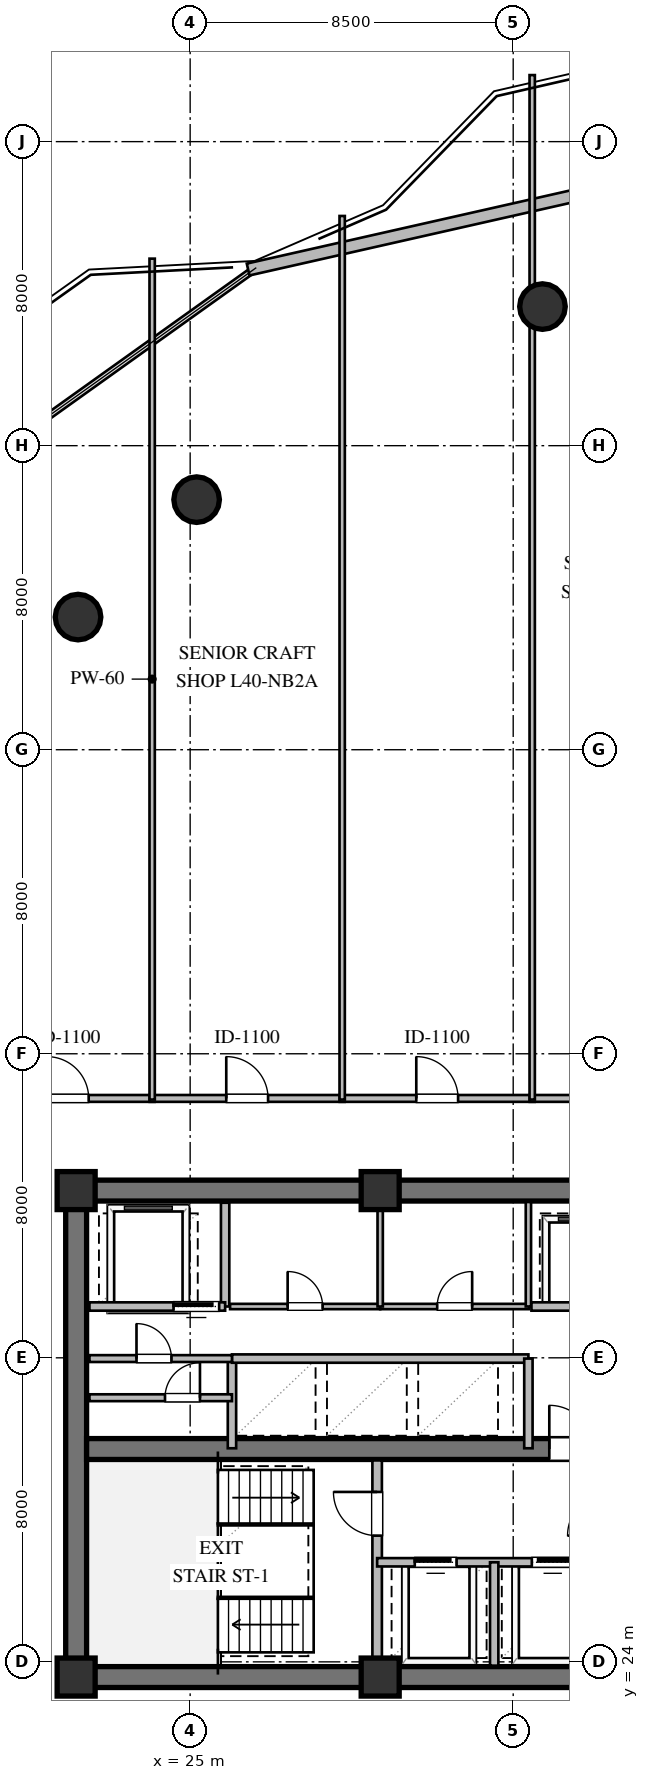
"""IFC4 building model, lengths in metres.
Left out: names, types, materials, properties, quantities, classifications, styles, units other than length and angle.
Written with IfcOpenShell. Run it as: python <this file> out.ifc"""

import sys

from ifc_helpers import new_model, si_unit, direction, frame, frame_2d, origin, origin_2d, place, context, subcontext, project, spatial, rectangle, circle, extrude, element, fill, save


model = new_model("IFC4")
c1 = context("Model", 3, precision=1e-05, world=origin(), true_north=direction((0.0, 1.0)))
c2 = subcontext(c1, "Body", "Model", "MODEL_VIEW")
j1 = project(units=[si_unit("LENGTHUNIT", "METRE"), si_unit("PLANEANGLEUNIT", "RADIAN")], contexts=[c1])
p1 = place(None, origin())
s1 = spatial("IfcSite", under=j1, at=p1, CompositionType="ELEMENT")
p2 = place(p1, origin())
s2 = spatial("IfcBuilding", under=s1, at=p2, CompositionType="ELEMENT")
p3 = place(p2, frame((0.0, 0.0, 153.0)))
s3 = spatial("IfcBuildingStorey", under=s2, at=p3, CompositionType="ELEMENT", Elevation=153.0)
for number, where, z_axis, x_axis in (
    (1, (21.725, 23.6, 0.0), (0.0, 0.0, 1.0), (1.0, 0.0, 0.0)),
    (2, (21.725, 36.4, 0.0), (0.0, 0.0, 1.0), (1.0, 0.0, 0.0)),
):
    element("IfcWall", number, at=place(p3, frame(where, z_axis=z_axis, x_axis=x_axis)), inside=s3, PredefinedType="SHEAR", context=c2, shape_type="SweptSolid", body=[
        extrude(rectangle(XDim=22.55, YDim=0.55, at=frame_2d((11.275, 0.0))), origin(), (0.0, 0.0, 1.0), 3.36),
    ])
p4 = place(p3, frame((22.0, 23.875, 0.0), z_axis=(0.0, 0.0, 1.0), x_axis=(0.0, 1.0, 0.0)))
e3 = element("IfcWall", 3, at=p4, inside=s3, PredefinedType="SHEAR", context=c2, shape_type="SweptSolid", body=[
    extrude(rectangle(XDim=12.25, YDim=0.55, at=frame_2d((6.125, 0.0))), origin(), (0.0, 0.0, 1.0), 3.36),
])
p5 = place(p3, frame((22.275, 29.6, 0.0), z_axis=(0.0, 0.0, 1.0), x_axis=(1.0, 0.0, 0.0)))
e4 = element("IfcWall", 4, at=p5, inside=s3, PredefinedType="SHEAR", context=c2, shape_type="SweptSolid", body=[
    extrude(rectangle(XDim=21.45, YDim=0.55, at=frame_2d((10.725, 0.0))), origin(), (0.0, 0.0, 1.0), 3.36),
])
p6 = place(p5, frame((12.175, 0.0, 0.0)))
e5 = element("IfcOpeningElement", 5, at=p6, cuts=e4, PredefinedType="OPENING", context=c2, shape_type="SweptSolid", body=[
    extrude(rectangle(XDim=1.15, YDim=2.1, at=frame_2d((0.575, 1.05))), frame((0.0, 0.285, 0.0), z_axis=(0.0, -1.0, 0.0), x_axis=(1.0, 0.0, 0.0)), (0.0, 0.0, 1.0), 0.57),
])
for number, where, z_axis, x_axis in (
    (6, (22.0, 23.6, 0.0), (0.0, 0.0, 1.0), (1.0, 0.0, 0.0)),
    (7, (30.0, 23.6, 0.0), (0.0, 0.0, 1.0), (1.0, 0.0, 0.0)),
    (8, (30.0, 36.4, 0.0), (0.0, 0.0, 1.0), (1.0, 0.0, 0.0)),
    (9, (22.0, 36.4, 0.0), (0.0, 0.0, 1.0), (1.0, 0.0, 0.0)),
):
    element("IfcColumn", number, at=place(p3, frame(where, z_axis=z_axis, x_axis=x_axis)), inside=s3, PredefinedType="COLUMN", context=c2, shape_type="SweptSolid", body=[
        extrude(rectangle(XDim=1.0, YDim=1.0, at=origin_2d()), origin(), (0.0, 0.0, 1.0), 3.6),
    ])
for number, where, z_axis, x_axis in (
    (10, (34.27, 59.66, 0.0), (0.0, 0.0, 1.0), (1.0, 0.0, 0.0)),
    (11, (25.17, 54.58, 0.0), (0.0, 0.0, 1.0), (1.0, 0.0, 0.0)),
    (12, (22.05, 51.49, 0.0), (0.0, 0.0, 1.0), (1.0, 0.0, 0.0)),
):
    element("IfcColumn", number, at=place(p3, frame(where, z_axis=z_axis, x_axis=x_axis)), inside=s3, PredefinedType="COLUMN", context=c2, shape_type="SweptSolid", body=[
        extrude(circle(Radius=0.6, at=origin_2d()), origin(), (0.0, 0.0, 1.0), 3.6),
    ])
p7 = place(p3, frame((26.525, 60.635, 0.0), z_axis=(0.0, 0.0, 1.0), x_axis=(0.975368700272, 0.220580820855, 0.0)))
e13 = element("IfcWall", 13, at=p7, inside=s3, PredefinedType="STANDARD", context=c2, shape_type="SweptSolid", body=[
    extrude(rectangle(XDim=19.204, YDim=0.32, at=frame_2d((9.602, 0.0))), origin(), (0.0, 0.0, 1.0), 3.36),
])
p8 = place(p7, frame((8.801, 0.0, 1.05)))
e14 = element("IfcOpeningElement", 14, at=p8, cuts=e13, PredefinedType="OPENING", context=c2, shape_type="SweptSolid", body=[
    extrude(rectangle(XDim=1.6, YDim=1.5, at=frame_2d((0.8, 0.75))), frame((0.0, 0.17, 0.0), z_axis=(0.0, -1.0, 0.0), x_axis=(1.0, 0.0, 0.0)), (0.0, 0.0, 1.0), 0.34),
])
p9 = place(p3, frame((29.92, 23.9, 0.0), z_axis=(0.0, 0.0, 1.0), x_axis=(0.0, 1.0, 0.0)))
e15 = element("IfcWall", 15, at=p9, inside=s3, PredefinedType="SOLIDWALL", context=c2, shape_type="SweptSolid", body=[
    extrude(rectangle(XDim=5.4, YDim=0.25, at=frame_2d((2.7, 0.0))), origin(), (0.0, 0.0, 1.0), 2.806),
])
p10 = place(p9, frame((3.421, 0.0, 0.0)))
e16 = element("IfcOpeningElement", 16, at=p10, cuts=e15, PredefinedType="OPENING", context=c2, shape_type="SweptSolid", body=[
    extrude(rectangle(XDim=1.15, YDim=2.1, at=frame_2d((0.575, 1.05))), frame((0.0, 0.135, 0.0), z_axis=(0.0, -1.0, 0.0), x_axis=(1.0, 0.0, 0.0)), (0.0, 0.0, 1.0), 0.27),
])
p11 = place(p3, frame((29.92, 26.62, 0.0), z_axis=(0.0, 0.0, 1.0), x_axis=(1.0, 0.0, 0.0)))
e17 = element("IfcWall", 17, at=p11, inside=s3, PredefinedType="SOLIDWALL", context=c2, shape_type="SweptSolid", body=[
    extrude(rectangle(XDim=6.16, YDim=0.22, at=frame_2d((3.08, 0.0))), origin(), (0.0, 0.0, 1.0), 3.36),
])
p12 = place(p11, frame((0.99, 0.0, 0.0)))
e18 = element("IfcOpeningElement", 18, at=p12, cuts=e17, PredefinedType="OPENING", context=c2, shape_type="SweptSolid", body=[
    extrude(rectangle(XDim=1.1, YDim=2.1, at=frame_2d((0.55, 1.05))), frame((0.0, 0.12, 0.0), z_axis=(0.0, -1.0, 0.0), x_axis=(1.0, 0.0, 0.0)), (0.0, 0.0, 1.0), 0.24),
])
p13 = place(p11, frame((4.07, 0.0, 0.0)))
e19 = element("IfcOpeningElement", 19, at=p13, cuts=e17, PredefinedType="OPENING", context=c2, shape_type="SweptSolid", body=[
    extrude(rectangle(XDim=1.1, YDim=2.1, at=frame_2d((0.55, 1.05))), frame((0.0, 0.12, 0.0), z_axis=(0.0, -1.0, 0.0), x_axis=(1.0, 0.0, 0.0)), (0.0, 0.0, 1.0), 0.24),
])
p14 = place(p3, frame((33.0, 23.9, 0.0), z_axis=(0.0, 0.0, 1.0), x_axis=(0.0, 1.0, 0.0)))
e20 = element("IfcWall", 20, at=p14, inside=s3, PredefinedType="SOLIDWALL", context=c2, shape_type="SweptSolid", body=[
    extrude(rectangle(XDim=2.72, YDim=0.22, at=frame_2d((1.36, 0.0))), origin(), (0.0, 0.0, 1.0), 3.36),
])
p15 = place(p3, frame((25.92, 33.35, 0.0), z_axis=(0.0, 0.0, 1.0), x_axis=(0.0, 1.0, 0.0)))
e21 = element("IfcWall", 21, at=p15, inside=s3, PredefinedType="SOLIDWALL", context=c2, shape_type="SweptSolid", body=[
    extrude(rectangle(XDim=2.73, YDim=0.22, at=frame_2d((1.365, 0.0))), origin(), (0.0, 0.0, 1.0), 3.36),
])
p16 = place(p3, frame((22.35, 33.35, 0.0), z_axis=(0.0, 0.0, 1.0), x_axis=(1.0, 0.0, 0.0)))
e22 = element("IfcWall", 22, at=p16, inside=s3, PredefinedType="SOLIDWALL", context=c2, shape_type="SweptSolid", body=[
    extrude(rectangle(XDim=3.57, YDim=0.22, at=frame_2d((1.785, 0.0))), origin(), (0.0, 0.0, 1.0), 3.36),
])
p17 = place(p16, frame((2.213, 0.0, 0.0)))
e23 = element("IfcOpeningElement", 23, at=p17, cuts=e22, PredefinedType="OPENING", context=c2, shape_type="SweptSolid", body=[
    extrude(rectangle(XDim=1.2, YDim=2.1, at=frame_2d((0.6, 1.05))), frame((0.0, 0.12, 0.0), z_axis=(0.0, -1.0, 0.0), x_axis=(1.0, 0.0, 0.0)), (0.0, 0.0, 1.0), 0.24),
])
p18 = place(p3, frame((26.1, 29.62, 0.0), z_axis=(0.0, 0.0, 1.0), x_axis=(0.0, 1.0, 0.0)))
e24 = element("IfcWall", 24, at=p18, inside=s3, PredefinedType="SOLIDWALL", context=c2, shape_type="SweptSolid", body=[
    extrude(rectangle(XDim=2.36, YDim=0.22, at=frame_2d((1.18, 0.0))), origin(), (0.0, 0.0, 1.0), 3.36),
])
p19 = place(p3, frame((26.1, 31.98, 0.0), z_axis=(0.0, 0.0, 1.0), x_axis=(1.0, 0.0, 0.0)))
e25 = element("IfcWall", 25, at=p19, inside=s3, PredefinedType="SOLIDWALL", context=c2, shape_type="SweptSolid", body=[
    extrude(rectangle(XDim=7.8, YDim=0.22, at=frame_2d((3.9, 0.0))), origin(), (0.0, 0.0, 1.0), 3.36),
])
p20 = place(p3, frame((33.9, 29.62, 0.0), z_axis=(0.0, 0.0, 1.0), x_axis=(0.0, 1.0, 0.0)))
e26 = element("IfcWall", 26, at=p20, inside=s3, PredefinedType="SOLIDWALL", context=c2, shape_type="SweptSolid", body=[
    extrude(rectangle(XDim=2.36, YDim=0.22, at=frame_2d((1.18, 0.0))), origin(), (0.0, 0.0, 1.0), 3.36),
])
p21 = place(p3, frame((26.05, 33.35, 0.0), z_axis=(0.0, 0.0, 1.0), x_axis=(1.0, 0.0, 0.0)))
e27 = element("IfcWall", 27, at=p21, inside=s3, PredefinedType="PARTITIONING", context=c2, shape_type="SweptSolid", body=[
    extrude(rectangle(XDim=3.95, YDim=0.14, at=frame_2d((1.975, 0.0))), origin(), (0.0, 0.0, 1.0), 3.36),
])
p22 = place(p21, frame((1.515, 0.0, 0.0)))
e28 = element("IfcOpeningElement", 28, at=p22, cuts=e27, PredefinedType="OPENING", context=c2, shape_type="SweptSolid", body=[
    extrude(rectangle(XDim=0.92, YDim=2.1, at=frame_2d((0.46, 1.05))), frame((0.0, 0.08, 0.0), z_axis=(0.0, -1.0, 0.0), x_axis=(1.0, 0.0, 0.0)), (0.0, 0.0, 1.0), 0.16),
])
p23 = place(p3, frame((30.0, 33.35, 0.0), z_axis=(0.0, 0.0, 1.0), x_axis=(1.0, 0.0, 0.0)))
e29 = element("IfcWall", 29, at=p23, inside=s3, PredefinedType="PARTITIONING", context=c2, shape_type="SweptSolid", body=[
    extrude(rectangle(XDim=3.92, YDim=0.14, at=frame_2d((1.96, 0.0))), origin(), (0.0, 0.0, 1.0), 3.36),
])
p24 = place(p23, frame((1.5, 0.0, 0.0)))
e30 = element("IfcOpeningElement", 30, at=p24, cuts=e29, PredefinedType="OPENING", context=c2, shape_type="SweptSolid", body=[
    extrude(rectangle(XDim=0.92, YDim=2.1, at=frame_2d((0.46, 1.05))), frame((0.0, 0.08, 0.0), z_axis=(0.0, -1.0, 0.0), x_axis=(1.0, 0.0, 0.0)), (0.0, 0.0, 1.0), 0.16),
])
for number, where, z_axis, x_axis in (
    (31, (30.0, 33.35, 0.0), (0.0, 0.0, 1.0), (0.0, 1.0, 0.0)),
    (32, (33.9, 33.35, 0.0), (0.0, 0.0, 1.0), (0.0, 1.0, 0.0)),
):
    element("IfcWall", number, at=place(p3, frame(where, z_axis=z_axis, x_axis=x_axis)), inside=s3, PredefinedType="PARTITIONING", context=c2, shape_type="SweptSolid", body=[
        extrude(rectangle(XDim=2.75, YDim=0.14, at=frame_2d((1.375, 0.0))), origin(), (0.0, 0.0, 1.0), 3.36),
    ])
p25 = place(p3, frame((33.98, 33.35, 0.0), z_axis=(0.0, 0.0, 1.0), x_axis=(1.0, 0.0, 0.0)))
e33 = element("IfcWall", 33, at=p25, inside=s3, PredefinedType="SOLIDWALL", context=c2, shape_type="SweptSolid", body=[
    extrude(rectangle(XDim=7.54, YDim=0.22, at=frame_2d((3.77, 0.0))), origin(), (0.0, 0.0, 1.0), 3.36),
])
p26 = place(p25, frame((1.335, 0.0, 0.0)))
e34 = element("IfcOpeningElement", 34, at=p26, cuts=e33, PredefinedType="OPENING", context=c2, shape_type="SweptSolid", body=[
    extrude(rectangle(XDim=1.1, YDim=2.1, at=frame_2d((0.55, 1.05))), frame((0.0, 0.12, 0.0), z_axis=(0.0, -1.0, 0.0), x_axis=(1.0, 0.0, 0.0)), (0.0, 0.0, 1.0), 0.24),
])
p27 = place(p25, frame((4.879, 0.0, 0.0)))
e35 = element("IfcOpeningElement", 35, at=p27, cuts=e33, PredefinedType="OPENING", context=c2, shape_type="SweptSolid", body=[
    extrude(rectangle(XDim=1.1, YDim=2.1, at=frame_2d((0.55, 1.05))), frame((0.0, 0.12, 0.0), z_axis=(0.0, -1.0, 0.0), x_axis=(1.0, 0.0, 0.0)), (0.0, 0.0, 1.0), 0.24),
])
p28 = place(p3, frame((22.35, 30.95, 0.0), z_axis=(0.0, 0.0, 1.0), x_axis=(1.0, 0.0, 0.0)))
e36 = element("IfcWall", 36, at=p28, inside=s3, PredefinedType="PARTITIONING", context=c2, shape_type="SweptSolid", body=[
    extrude(rectangle(XDim=3.75, YDim=0.18, at=frame_2d((1.875, 0.0))), origin(), (0.0, 0.0, 1.0), 3.36),
])
p29 = place(p28, frame((1.988, 0.0, 0.0)))
e37 = element("IfcOpeningElement", 37, at=p29, cuts=e36, PredefinedType="OPENING", context=c2, shape_type="SweptSolid", body=[
    extrude(rectangle(XDim=0.92, YDim=2.1, at=frame_2d((0.46, 1.05))), frame((0.0, 0.1, 0.0), z_axis=(0.0, -1.0, 0.0), x_axis=(1.0, 0.0, 0.0)), (0.0, 0.0, 1.0), 0.2),
])
p30 = place(p3, frame((22.35, 31.98, 0.0), z_axis=(0.0, 0.0, 1.0), x_axis=(1.0, 0.0, 0.0)))
e38 = element("IfcWall", 38, at=p30, inside=s3, PredefinedType="PARTITIONING", context=c2, shape_type="SweptSolid", body=[
    extrude(rectangle(XDim=3.75, YDim=0.18, at=frame_2d((1.875, 0.0))), origin(), (0.0, 0.0, 1.0), 3.36),
])
p31 = place(p30, frame((1.238, 0.0, 0.0)))
e39 = element("IfcOpeningElement", 39, at=p31, cuts=e38, PredefinedType="OPENING", context=c2, shape_type="SweptSolid", body=[
    extrude(rectangle(XDim=0.92, YDim=2.1, at=frame_2d((0.46, 1.05))), frame((0.0, 0.1, 0.0), z_axis=(0.0, -1.0, 0.0), x_axis=(1.0, 0.0, 0.0)), (0.0, 0.0, 1.0), 0.2),
])
p32 = place(p3, frame((19.495, 38.825, 0.0), z_axis=(0.0, 0.0, 1.0), x_axis=(1.0, 0.0, 0.0)))
e40 = element("IfcWall", 40, at=p32, inside=s3, PredefinedType="PARTITIONING", context=c2, shape_type="SweptSolid", body=[
    extrude(rectangle(XDim=4.57, YDim=0.18, at=frame_2d((2.285, 0.0))), origin(), (0.0, 0.0, 1.0), 3.36),
])
p33 = place(p32, frame((1.735, 0.0, 0.0)))
e41 = element("IfcOpeningElement", 41, at=p33, cuts=e40, PredefinedType="OPENING", context=c2, shape_type="SweptSolid", body=[
    extrude(rectangle(XDim=1.1, YDim=2.1, at=frame_2d((0.55, 1.05))), frame((0.0, 0.1, 0.0), z_axis=(0.0, -1.0, 0.0), x_axis=(1.0, 0.0, 0.0)), (0.0, 0.0, 1.0), 0.2),
])
p34 = place(p3, frame((23.935, 38.825, 0.0), z_axis=(0.0, 0.0, 1.0), x_axis=(1.0, 0.0, 0.0)))
e42 = element("IfcWall", 42, at=p34, inside=s3, PredefinedType="PARTITIONING", context=c2, shape_type="SweptSolid", body=[
    extrude(rectangle(XDim=5.13, YDim=0.18, at=frame_2d((2.565, 0.0))), origin(), (0.0, 0.0, 1.0), 3.36),
])
p35 = place(p34, frame((2.015, 0.0, 0.0)))
e43 = element("IfcOpeningElement", 43, at=p35, cuts=e42, PredefinedType="OPENING", context=c2, shape_type="SweptSolid", body=[
    extrude(rectangle(XDim=1.1, YDim=2.1, at=frame_2d((0.55, 1.05))), frame((0.0, 0.1, 0.0), z_axis=(0.0, -1.0, 0.0), x_axis=(1.0, 0.0, 0.0)), (0.0, 0.0, 1.0), 0.2),
])
p36 = place(p3, frame((28.935, 38.825, 0.0), z_axis=(0.0, 0.0, 1.0), x_axis=(1.0, 0.0, 0.0)))
e44 = element("IfcWall", 44, at=p36, inside=s3, PredefinedType="PARTITIONING", context=c2, shape_type="SweptSolid", body=[
    extrude(rectangle(XDim=5.13, YDim=0.18, at=frame_2d((2.565, 0.0))), origin(), (0.0, 0.0, 1.0), 3.36),
])
p37 = place(p36, frame((2.015, 0.0, 0.0)))
e45 = element("IfcOpeningElement", 45, at=p37, cuts=e44, PredefinedType="OPENING", context=c2, shape_type="SweptSolid", body=[
    extrude(rectangle(XDim=1.1, YDim=2.1, at=frame_2d((0.55, 1.05))), frame((0.0, 0.1, 0.0), z_axis=(0.0, -1.0, 0.0), x_axis=(1.0, 0.0, 0.0)), (0.0, 0.0, 1.0), 0.2),
])
p38 = place(p3, frame((33.935, 38.825, 0.0), z_axis=(0.0, 0.0, 1.0), x_axis=(1.0, 0.0, 0.0)))
e46 = element("IfcWall", 46, at=p38, inside=s3, PredefinedType="PARTITIONING", context=c2, shape_type="SweptSolid", body=[
    extrude(rectangle(XDim=5.38, YDim=0.18, at=frame_2d((2.69, 0.0))), origin(), (0.0, 0.0, 1.0), 3.36),
])
p39 = place(p38, frame((2.14, 0.0, 0.0)))
e47 = element("IfcOpeningElement", 47, at=p39, cuts=e46, PredefinedType="OPENING", context=c2, shape_type="SweptSolid", body=[
    extrude(rectangle(XDim=1.1, YDim=2.1, at=frame_2d((0.55, 1.05))), frame((0.0, 0.1, 0.0), z_axis=(0.0, -1.0, 0.0), x_axis=(1.0, 0.0, 0.0)), (0.0, 0.0, 1.0), 0.2),
])
p40 = place(p3, frame((24.0, 60.921, 0.0), z_axis=(0.0, 0.0, 1.0), x_axis=(0.0, -1.0, 0.0)))
e48 = element("IfcWall", 48, at=p40, inside=s3, PredefinedType="PARTITIONING", context=c2, shape_type="SweptSolid", body=[
    extrude(rectangle(XDim=22.126, YDim=0.14, at=frame_2d((11.063, 0.0))), origin(), (0.0, 0.0, 1.0), 2.806),
])
p41 = place(p3, frame((29.0, 62.044, 0.0), z_axis=(0.0, 0.0, 1.0), x_axis=(0.0, -1.0, 0.0)))
e49 = element("IfcWall", 49, at=p41, inside=s3, PredefinedType="PARTITIONING", context=c2, shape_type="SweptSolid", body=[
    extrude(rectangle(XDim=23.249, YDim=0.14, at=frame_2d((11.625, 0.0))), origin(), (0.0, 0.0, 1.0), 3.36),
])
p42 = place(p3, frame((34.0, 65.751, 0.0), z_axis=(0.0, 0.0, 1.0), x_axis=(0.0, -1.0, 0.0)))
e50 = element("IfcWall", 50, at=p42, inside=s3, PredefinedType="PARTITIONING", context=c2, shape_type="SweptSolid", body=[
    extrude(rectangle(XDim=26.956, YDim=0.14, at=frame_2d((13.478, 0.0))), origin(), (0.0, 0.0, 1.0), 2.806),
])
p43 = place(p10, origin())
e51 = element("IfcDoor", 51, at=p43, inside=s3, OperationType="SINGLE_SWING_RIGHT", PredefinedType="DOOR", context=c2, shape_type="SweptSolid", body=[
    extrude(rectangle(XDim=1.15, YDim=2.1, at=frame_2d((0.575, 1.05))), frame((0.0, 0.025, 0.0), z_axis=(0.0, -1.0, 0.0), x_axis=(1.0, 0.0, 0.0)), (0.0, 0.0, 1.0), 0.05),
])
fill(e16, e51)
p44 = place(p12, origin())
e52 = element("IfcDoor", 52, at=p44, inside=s3, OperationType="SLIDING_TO_LEFT", PredefinedType="DOOR", context=c2, shape_type="SweptSolid", body=[
    extrude(rectangle(XDim=1.1, YDim=2.1, at=frame_2d((0.55, 1.05))), frame((0.0, 0.025, 0.0), z_axis=(0.0, -1.0, 0.0), x_axis=(1.0, 0.0, 0.0)), (0.0, 0.0, 1.0), 0.05),
])
fill(e18, e52)
p45 = place(p13, origin())
e53 = element("IfcDoor", 53, at=p45, inside=s3, OperationType="SLIDING_TO_RIGHT", PredefinedType="DOOR", context=c2, shape_type="SweptSolid", body=[
    extrude(rectangle(XDim=1.1, YDim=2.1, at=frame_2d((0.55, 1.05))), frame((0.0, 0.025, 0.0), z_axis=(0.0, -1.0, 0.0), x_axis=(1.0, 0.0, 0.0)), (0.0, 0.0, 1.0), 0.05),
])
fill(e19, e53)
p46 = place(p6, origin())
e54 = element("IfcDoor", 54, at=p46, inside=s3, OperationType="SINGLE_SWING_LEFT", PredefinedType="DOOR", context=c2, shape_type="SweptSolid", body=[
    extrude(rectangle(XDim=1.15, YDim=2.1, at=frame_2d((0.575, 1.05))), frame((0.0, 0.025, 0.0), z_axis=(0.0, -1.0, 0.0), x_axis=(1.0, 0.0, 0.0)), (0.0, 0.0, 1.0), 0.05),
])
fill(e5, e54)
p47 = place(p17, origin())
e55 = element("IfcDoor", 55, at=p47, inside=s3, OperationType="SLIDING_TO_LEFT", PredefinedType="DOOR", context=c2, shape_type="SweptSolid", body=[
    extrude(rectangle(XDim=1.2, YDim=2.1, at=frame_2d((0.6, 1.05))), frame((0.0, 0.025, 0.0), z_axis=(0.0, -1.0, 0.0), x_axis=(1.0, 0.0, 0.0)), (0.0, 0.0, 1.0), 0.05),
])
fill(e23, e55)
p48 = place(p22, origin())
e56 = element("IfcDoor", 56, at=p48, inside=s3, OperationType="SINGLE_SWING_LEFT", PredefinedType="DOOR", context=c2, shape_type="SweptSolid", body=[
    extrude(rectangle(XDim=0.92, YDim=2.1, at=frame_2d((0.46, 1.05))), frame((0.0, 0.025, 0.0), z_axis=(0.0, -1.0, 0.0), x_axis=(1.0, 0.0, 0.0)), (0.0, 0.0, 1.0), 0.05),
])
fill(e28, e56)
p49 = place(p24, origin())
e57 = element("IfcDoor", 57, at=p49, inside=s3, OperationType="SINGLE_SWING_RIGHT", PredefinedType="DOOR", context=c2, shape_type="SweptSolid", body=[
    extrude(rectangle(XDim=0.92, YDim=2.1, at=frame_2d((0.46, 1.05))), frame((0.0, 0.025, 0.0), z_axis=(0.0, -1.0, 0.0), x_axis=(1.0, 0.0, 0.0)), (0.0, 0.0, 1.0), 0.05),
])
fill(e30, e57)
p50 = place(p31, origin())
e58 = element("IfcDoor", 58, at=p50, inside=s3, OperationType="SINGLE_SWING_LEFT", PredefinedType="DOOR", context=c2, shape_type="SweptSolid", body=[
    extrude(rectangle(XDim=0.92, YDim=2.1, at=frame_2d((0.46, 1.05))), frame((0.0, 0.025, 0.0), z_axis=(0.0, -1.0, 0.0), x_axis=(1.0, 0.0, 0.0)), (0.0, 0.0, 1.0), 0.05),
])
fill(e39, e58)
p51 = place(p29, origin())
e59 = element("IfcDoor", 59, at=p51, inside=s3, OperationType="SINGLE_SWING_RIGHT", PredefinedType="DOOR", context=c2, shape_type="SweptSolid", body=[
    extrude(rectangle(XDim=0.92, YDim=2.1, at=frame_2d((0.46, 1.05))), frame((0.0, 0.025, 0.0), z_axis=(0.0, -1.0, 0.0), x_axis=(1.0, 0.0, 0.0)), (0.0, 0.0, 1.0), 0.05),
])
fill(e37, e59)
p52 = place(p33, origin())
e60 = element("IfcDoor", 60, at=p52, inside=s3, OperationType="SINGLE_SWING_LEFT", PredefinedType="DOOR", context=c2, shape_type="SweptSolid", body=[
    extrude(rectangle(XDim=1.1, YDim=2.1, at=frame_2d((0.55, 1.05))), frame((0.0, 0.025, 0.0), z_axis=(0.0, -1.0, 0.0), x_axis=(1.0, 0.0, 0.0)), (0.0, 0.0, 1.0), 0.05),
])
fill(e41, e60)
p53 = place(p35, origin())
e61 = element("IfcDoor", 61, at=p53, inside=s3, OperationType="SINGLE_SWING_LEFT", PredefinedType="DOOR", context=c2, shape_type="SweptSolid", body=[
    extrude(rectangle(XDim=1.1, YDim=2.1, at=frame_2d((0.55, 1.05))), frame((0.0, 0.025, 0.0), z_axis=(0.0, -1.0, 0.0), x_axis=(1.0, 0.0, 0.0)), (0.0, 0.0, 1.0), 0.05),
])
fill(e43, e61)
p54 = place(p37, origin())
e62 = element("IfcDoor", 62, at=p54, inside=s3, OperationType="SINGLE_SWING_LEFT", PredefinedType="DOOR", context=c2, shape_type="SweptSolid", body=[
    extrude(rectangle(XDim=1.1, YDim=2.1, at=frame_2d((0.55, 1.05))), frame((0.0, 0.025, 0.0), z_axis=(0.0, -1.0, 0.0), x_axis=(1.0, 0.0, 0.0)), (0.0, 0.0, 1.0), 0.05),
])
fill(e45, e62)
save(model, sys.argv[1])
